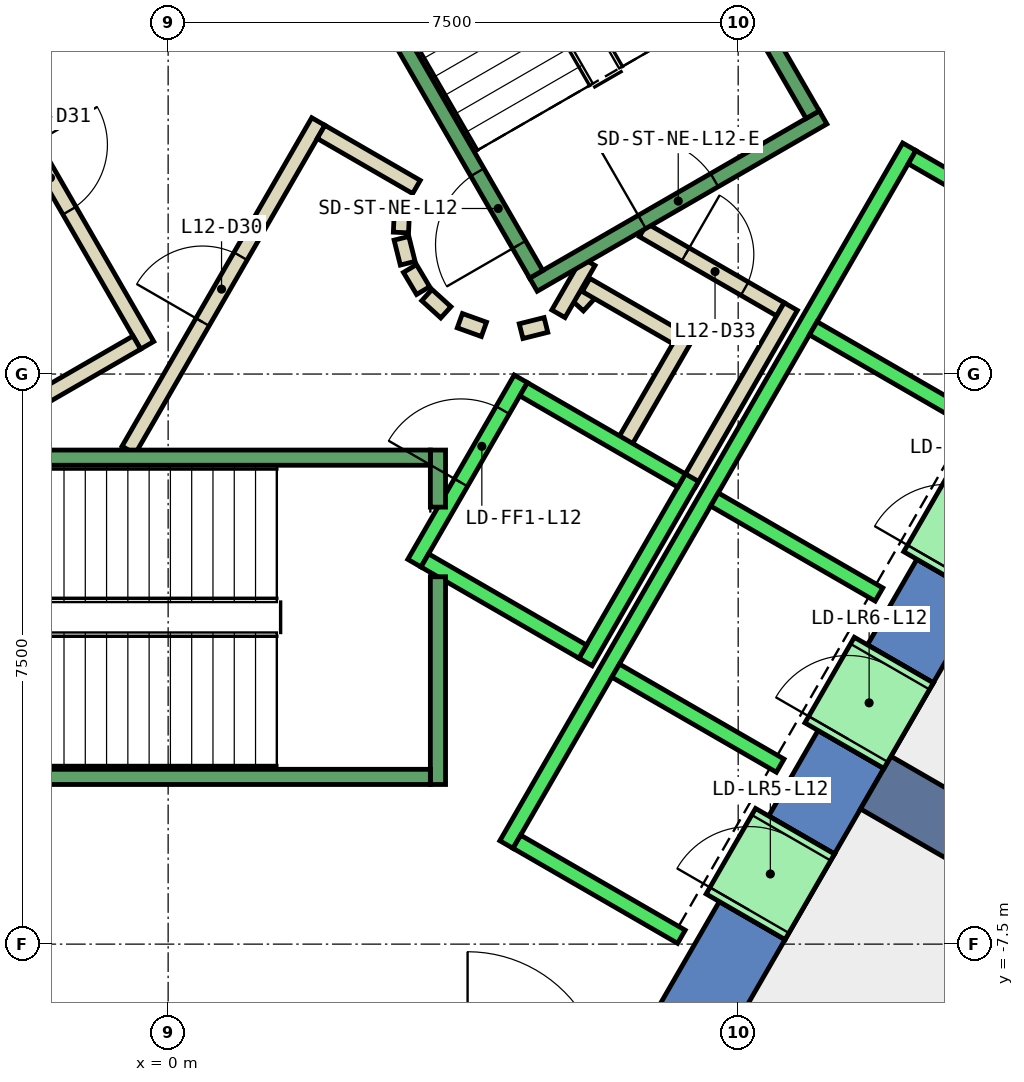
"""IFC4 building model, lengths in metres.
Left out: names, types, materials, properties, quantities, classifications, styles, units other than length and angle.
Written with IfcOpenShell. Run it as: python <this file> out.ifc"""

import sys

from ifc_helpers import new_model, si_unit, direction, frame, frame_2d, origin, place, context, subcontext, project, spatial, polyline, rectangle, outline, extrude, element, fill, save


model = new_model("IFC4")
c1 = context("Model", 3, precision=1e-05, world=origin(), true_north=direction((0.0, 1.0)))
c2 = subcontext(c1, "Body", "Model", "MODEL_VIEW")
j1 = project(units=[si_unit("LENGTHUNIT", "METRE"), si_unit("PLANEANGLEUNIT", "RADIAN")], contexts=[c1])
p1 = place(None, origin())
s1 = spatial("IfcSite", under=j1, at=p1, CompositionType="ELEMENT")
p2 = place(p1, origin())
s2 = spatial("IfcBuilding", under=s1, at=p2, CompositionType="ELEMENT")
p3 = place(p2, frame((0.0, 0.0, 60.2)))
s3 = spatial("IfcBuildingStorey", under=s2, at=p3, CompositionType="ELEMENT", Elevation=60.2)
p4 = place(p3, frame((0.0, 0.0, -0.4)))
e1 = element("IfcWall", 1, at=p4, inside=s3, PredefinedType="SHEAR", context=c2, shape_type="SweptSolid", body=[
    extrude(outline(polyline([(8.517, 11.748), (7.651, 11.248), (12.702, 2.5), (13.856, 2.5), (8.517, 11.748)])), origin(), (0.0, 0.0, 1.0), 4.2),
])
p5 = place(p3, frame((0.0, 0.0, -0.4)))
e2 = element("IfcWall", 2, at=p5, inside=s3, PredefinedType="SHEAR", context=c2, shape_type="SweptSolid", body=[
    extrude(outline(polyline([(8.117, -7.44), (7.252, -6.94), (6.351, -8.5), (6.928, -9.5), (8.117, -7.44)])), origin(), (0.0, 0.0, 1.0), 4.2),
])
p6 = place(p3, frame((0.0, 0.0, -0.4)))
e3 = element("IfcWall", 3, at=p6, inside=s3, PredefinedType="SHEAR", context=c2, shape_type="SweptSolid", body=[
    extrude(outline(polyline([(9.417, -5.189), (8.551, -4.689), (7.902, -5.814), (8.767, -6.314), (9.417, -5.189)])), origin(), (0.0, 0.0, 1.0), 4.2),
])
p7 = place(p3, frame((0.0, 0.0, -0.4)))
e4 = element("IfcWall", 4, at=p7, inside=s3, PredefinedType="SHEAR", context=c2, shape_type="SweptSolid", body=[
    extrude(outline(polyline([(10.717, -2.937), (9.851, -2.437), (9.201, -3.563), (10.067, -4.063), (10.717, -2.937)])), origin(), (0.0, 0.0, 1.0), 4.2),
])
p8 = place(p3, frame((0.0, 0.0, 3.6)))
e5 = element("IfcWall", 5, at=p8, inside=s3, PredefinedType="SHEAR", context=c2, shape_type="SweptSolid", body=[
    extrude(outline(polyline([(8.767, -6.314), (7.902, -5.814), (7.252, -6.94), (8.117, -7.44), (8.767, -6.314)])), origin(), (0.0, 0.0, 1.0), 0.2),
])
p9 = place(p3, frame((0.0, 0.0, 3.6)))
e6 = element("IfcWall", 6, at=p9, inside=s3, PredefinedType="SHEAR", context=c2, shape_type="SweptSolid", body=[
    extrude(outline(polyline([(10.067, -4.063), (9.201, -3.563), (8.551, -4.689), (9.417, -5.189), (10.067, -4.063)])), origin(), (0.0, 0.0, 1.0), 0.2),
])
p10 = place(p3, frame((0.0, 0.0, 3.6)))
e7 = element("IfcWall", 7, at=p10, inside=s3, PredefinedType="SHEAR", context=c2, shape_type="SweptSolid", body=[
    extrude(outline(polyline([(11.367, -1.811), (10.501, -1.311), (9.851, -2.437), (10.717, -2.937), (11.367, -1.811)])), origin(), (0.0, 0.0, 1.0), 0.2),
])
p11 = place(p3, frame((9.31, -5.375, -0.4), z_axis=(0.0, 0.0, 1.0), x_axis=(0.866017533419, -0.500013631625, 0.0)))
e8 = element("IfcWall", 8, at=p11, inside=s3, PredefinedType="SHEAR", context=c2, shape_type="SweptSolid", body=[
    extrude(rectangle(XDim=9.0, YDim=0.8, at=frame_2d((4.5, 0.0))), origin(), (0.0, 0.0, 1.0), 4.2),
])
p12 = place(p3, frame((5.39, 0.898, 0.0), z_axis=(0.0, 0.0, 1.0), x_axis=(0.673828488714, 0.738887791073, 0.0)))
e9 = element("IfcWall", 9, at=p12, inside=s3, PredefinedType="PARTITIONING", context=c2, shape_type="SweptSolid", body=[
    extrude(rectangle(XDim=0.263, YDim=0.2, at=frame_2d((0.131, 0.0))), origin(), (0.0, 0.0, 1.0), 3.8),
])
p13 = place(p3, frame((5.499, 1.172, 0.0), z_axis=(0.0, 0.0, 1.0), x_axis=(0.866333505267, -0.499465972466, 0.0)))
e10 = element("IfcWall", 10, at=p13, inside=s3, PredefinedType="PARTITIONING", context=c2, shape_type="SweptSolid", body=[
    extrude(rectangle(XDim=1.374, YDim=0.2, at=frame_2d((0.687, 0.0))), origin(), (0.0, 0.0, 1.0), 3.8),
])
p14 = place(p3, frame((6.826, 0.522, 0.0), z_axis=(0.0, 0.0, 1.0), x_axis=(-0.500016722714, -0.866015748706, 0.0)))
e11 = element("IfcWall", 11, at=p14, inside=s3, PredefinedType="PARTITIONING", context=c2, shape_type="SweptSolid", body=[
    extrude(rectangle(XDim=1.7, YDim=0.2, at=frame_2d((0.85, 0.0))), origin(), (0.0, 0.0, 1.0), 3.8),
])
p15 = place(p3, frame((6.25, 1.894, 0.0), z_axis=(0.0, 0.0, 1.0), x_axis=(0.866043184279, -0.499969202016, 0.0)))
e12 = element("IfcWall", 12, at=p15, inside=s3, PredefinedType="PARTITIONING", context=c2, shape_type="SweptSolid", body=[
    extrude(rectangle(XDim=2.084, YDim=0.2, at=frame_2d((1.042, 0.0))), origin(), (0.0, 0.0, 1.0), 3.8),
])
p16 = place(p15, frame((0.642, 0.0, 0.0)))
e13 = element("IfcOpeningElement", 13, at=p16, cuts=e12, PredefinedType="OPENING", context=c2, shape_type="SweptSolid", body=[
    extrude(rectangle(XDim=0.9, YDim=2.1, at=frame_2d((0.45, 1.05))), frame((0.0, 0.11, 0.0), z_axis=(0.0, -1.0, 0.0), x_axis=(1.0, 0.0, 0.0)), (0.0, 0.0, 1.0), 0.22),
])
p17 = place(p3, frame((8.192, 0.888, 0.0), z_axis=(0.0, 0.0, 1.0), x_axis=(-0.499940625693, -0.866059680843, 0.0)))
e14 = element("IfcWall", 14, at=p17, inside=s3, PredefinedType="PARTITIONING", context=c2, shape_type="SweptSolid", body=[
    extrude(rectangle(XDim=2.68, YDim=0.2, at=frame_2d((1.34, 0.0))), origin(), (0.0, 0.0, 1.0), 3.8),
])
p18 = place(p3, frame((5.135, 0.793, 0.0), z_axis=(0.0, 0.0, 1.0), x_axis=(0.499526442893, 0.866298639529, 0.0)))
e15 = element("IfcWall", 15, at=p18, inside=s3, PredefinedType="PARTITIONING", context=c2, shape_type="SweptSolid", body=[
    extrude(rectangle(XDim=0.791, YDim=0.2, at=frame_2d((0.396, 0.0))), origin(), (0.0, 0.0, 1.0), 3.8),
])
p19 = place(p3, frame((-0.52, -1.0, 0.0), z_axis=(0.0, 0.0, 1.0), x_axis=(0.50011622646, 0.865958290007, 0.0)))
e16 = element("IfcWall", 16, at=p19, inside=s3, PredefinedType="PARTITIONING", context=c2, shape_type="SweptSolid", body=[
    extrude(rectangle(XDim=4.991, YDim=0.2, at=frame_2d((2.496, 0.0))), origin(), (0.0, 0.0, 1.0), 3.8),
])
p20 = place(p19, frame((1.945, 0.0, 0.0)))
e17 = element("IfcOpeningElement", 17, at=p20, cuts=e16, PredefinedType="OPENING", context=c2, shape_type="SweptSolid", body=[
    extrude(rectangle(XDim=1.0, YDim=2.1, at=frame_2d((0.5, 1.05))), frame((0.0, 0.11, 0.0), z_axis=(0.0, -1.0, 0.0), x_axis=(1.0, 0.0, 0.0)), (0.0, 0.0, 1.0), 0.22),
])
p21 = place(p3, frame((2.012, 3.186, 0.0), z_axis=(0.0, 0.0, 1.0), x_axis=(0.865891012941, -0.500232699559, 0.0)))
e18 = element("IfcWall", 18, at=p21, inside=s3, PredefinedType="PARTITIONING", context=c2, shape_type="SweptSolid", body=[
    extrude(rectangle(XDim=1.449, YDim=0.2, at=frame_2d((0.725, 0.0))), origin(), (0.0, 0.0, 1.0), 3.8),
])
p22 = place(p3, frame((3.079, 2.199, 0.0), z_axis=(0.0, 0.0, 1.0), x_axis=(-0.047771483479, -0.998858290933, 0.0)))
e19 = element("IfcWall", 19, at=p22, inside=s3, PredefinedType="PARTITIONING", context=c2, shape_type="SweptSolid", body=[
    extrude(rectangle(XDim=0.337, YDim=0.2, at=frame_2d((0.169, 0.0))), origin(), (0.0, 0.0, 1.0), 3.8),
])
p23 = place(p3, frame((3.07, 1.786, 0.0), z_axis=(0.0, 0.0, 1.0), x_axis=(0.242705583207, -0.970099994784, 0.0)))
e20 = element("IfcWall", 20, at=p23, inside=s3, PredefinedType="PARTITIONING", context=c2, shape_type="SweptSolid", body=[
    extrude(rectangle(XDim=0.338, YDim=0.2, at=frame_2d((0.169, 0.0))), origin(), (0.0, 0.0, 1.0), 3.8),
])
for number, where, z_axis, x_axis in (
    (21, (3.182, 1.388, 0.0), (0.0, 0.0, 1.0), (0.512, -0.859, 0.0)),
    (22, (3.404, 1.039, 0.0), (0.0, 0.0, 1.0), (0.74, -0.672, 0.0)),
):
    element("IfcWall", number, at=place(p3, frame(where, z_axis=z_axis, x_axis=x_axis)), inside=s3, PredefinedType="PARTITIONING", context=c2, shape_type="SweptSolid", body=[
        extrude(rectangle(XDim=0.338, YDim=0.2, at=frame_2d((0.169, 0.0))), origin(), (0.0, 0.0, 1.0), 3.8),
    ])
p24 = place(p3, frame((3.838, 0.702, 0.0), z_axis=(0.0, 0.0, 1.0), x_axis=(0.941035081519, -0.338308993895, 0.0)))
e23 = element("IfcWall", 23, at=p24, inside=s3, PredefinedType="PARTITIONING", context=c2, shape_type="SweptSolid", body=[
    extrude(rectangle(XDim=0.337, YDim=0.2, at=frame_2d((0.168, 0.0))), origin(), (0.0, 0.0, 1.0), 3.8),
])
p25 = place(p3, frame((4.644, 0.564, 0.0), z_axis=(0.0, 0.0, 1.0), x_axis=(0.969929076366, 0.243387729394, 0.0)))
e24 = element("IfcWall", 24, at=p25, inside=s3, PredefinedType="PARTITIONING", context=c2, shape_type="SweptSolid", body=[
    extrude(rectangle(XDim=0.337, YDim=0.2, at=frame_2d((0.168, 0.0))), origin(), (0.0, 0.0, 1.0), 3.8),
])
p26 = place(p3, frame((-2.771, 4.7, 0.0), z_axis=(0.0, 0.0, 1.0), x_axis=(0.499969479948, -0.866043023828, 0.0)))
e25 = element("IfcWall", 25, at=p26, inside=s3, PredefinedType="PARTITIONING", context=c2, shape_type="SweptSolid", body=[
    extrude(rectangle(XDim=4.99, YDim=0.2, at=frame_2d((2.495, 0.0))), origin(), (0.0, 0.0, 1.0), 3.8),
])
p27 = place(p26, frame((1.945, 0.0, 0.0)))
e26 = element("IfcOpeningElement", 26, at=p27, cuts=e25, PredefinedType="OPENING", context=c2, shape_type="SweptSolid", body=[
    extrude(rectangle(XDim=1.0, YDim=2.1, at=frame_2d((0.5, 1.05))), frame((0.0, 0.11, 0.0), z_axis=(0.0, -1.0, 0.0), x_axis=(1.0, 0.0, 0.0)), (0.0, 0.0, 1.0), 0.22),
])
p28 = place(p3, frame((-0.412, 0.414, 0.0), z_axis=(0.0, 0.0, 1.0), x_axis=(-0.866017369001, -0.500013916395, 0.0)))
e27 = element("IfcWall", 27, at=p28, inside=s3, PredefinedType="PARTITIONING", context=c2, shape_type="SweptSolid", body=[
    extrude(rectangle(XDim=1.45, YDim=0.2, at=frame_2d((0.725, 0.0))), origin(), (0.0, 0.0, 1.0), 3.8),
])
p29 = place(p3, frame((12.401, -7.622, 0.0), z_axis=(0.0, 0.0, 1.0), x_axis=(-0.500029185841, -0.866008552675, 0.0)))
e28 = element("IfcWall", 28, at=p29, inside=s3, PredefinedType="PARTITIONING", context=c2, shape_type="SweptSolid", body=[
    extrude(rectangle(XDim=9.301, YDim=0.2, at=frame_2d((4.651, 0.0))), origin(), (0.0, 0.0, 1.0), 3.8),
])
p30 = place(p3, frame((3.24, -2.488, 0.0), z_axis=(0.0, 0.0, 1.0), x_axis=(0.49994636267, 0.866056369097, 0.0)))
e29 = element("IfcWall", 29, at=p30, inside=s3, PredefinedType="STANDARD", context=c2, shape_type="SweptSolid", body=[
    extrude(rectangle(XDim=2.8, YDim=0.2, at=frame_2d((1.4, 0.0))), origin(), (0.0, 0.0, 1.0), 3.8),
])
p31 = place(p30, frame((1.225, 0.0, 0.0)))
e30 = element("IfcOpeningElement", 30, at=p31, cuts=e29, PredefinedType="OPENING", context=c2, shape_type="SweptSolid", body=[
    extrude(rectangle(XDim=1.1, YDim=2.1, at=frame_2d((0.55, 1.05))), frame((0.0, 0.11, 0.0), z_axis=(0.0, -1.0, 0.0), x_axis=(1.0, 0.0, 0.0)), (0.0, 0.0, 1.0), 0.22),
])
p32 = place(p3, frame((5.492, -3.788, 0.0), z_axis=(0.0, 0.0, 1.0), x_axis=(0.500011755427, 0.866018616679, 0.0)))
e31 = element("IfcWall", 31, at=p32, inside=s3, PredefinedType="STANDARD", context=c2, shape_type="SweptSolid", body=[
    extrude(rectangle(XDim=2.8, YDim=0.2, at=frame_2d((1.4, 0.0))), origin(), (0.0, 0.0, 1.0), 3.8),
])
p33 = place(p3, frame((3.377, -2.452, 0.0), z_axis=(0.0, 0.0, 1.0), x_axis=(0.865955154139, -0.50012165622, 0.0)))
e32 = element("IfcWall", 32, at=p33, inside=s3, PredefinedType="STANDARD", context=c2, shape_type="SweptSolid", body=[
    extrude(rectangle(XDim=2.4, YDim=0.2, at=frame_2d((1.2, 0.0))), origin(), (0.0, 0.0, 1.0), 3.8),
])
p34 = place(p3, frame((4.677, -0.2, 0.0), z_axis=(0.0, 0.0, 1.0), x_axis=(0.865973769406, -0.500089422704, 0.0)))
e33 = element("IfcWall", 33, at=p34, inside=s3, PredefinedType="STANDARD", context=c2, shape_type="SweptSolid", body=[
    extrude(rectangle(XDim=2.399, YDim=0.2, at=frame_2d((1.2, 0.0))), origin(), (0.0, 0.0, 1.0), 3.8),
])
p35 = place(p3, frame((4.451, -6.19, 0.0), z_axis=(0.0, 0.0, 1.0), x_axis=(0.50000090737, 0.866024879913, 0.0)))
e34 = element("IfcWall", 34, at=p35, inside=s3, PredefinedType="STANDARD", context=c2, shape_type="SweptSolid", body=[
    extrude(rectangle(XDim=10.6, YDim=0.2, at=frame_2d((5.3, 0.0))), origin(), (0.0, 0.0, 1.0), 3.8),
])
for number, where, z_axis, x_axis in (
    (35, (4.588, -6.153, 0.0), (0.0, 0.0, 1.0), (0.866, -0.5, 0.0)),
    (36, (5.888, -3.902, 0.0), (0.0, 0.0, 1.0), (0.866, -0.5, 0.0)),
    (37, (7.188, -1.65, 0.0), (0.0, 0.0, 1.0), (0.866, -0.5, 0.0)),
    (38, (8.488, 0.602, 0.0), (0.0, 0.0, 1.0), (0.866, -0.5, 0.0)),
):
    element("IfcWall", number, at=place(p3, frame(where, z_axis=z_axis, x_axis=x_axis)), inside=s3, PredefinedType="STANDARD", context=c2, shape_type="SweptSolid", body=[
        extrude(rectangle(XDim=2.5, YDim=0.2, at=frame_2d((1.25, 0.0))), origin(), (0.0, 0.0, 1.0), 3.8),
    ])
p36 = place(p3, frame((9.788, 2.853, 0.0), z_axis=(0.0, 0.0, 1.0), x_axis=(0.865998541277, -0.500046524342, 0.0)))
e39 = element("IfcWall", 39, at=p36, inside=s3, PredefinedType="STANDARD", context=c2, shape_type="SweptSolid", body=[
    extrude(rectangle(XDim=2.5, YDim=0.2, at=frame_2d((1.25, 0.0))), origin(), (0.0, 0.0, 1.0), 3.8),
])
p37 = place(p3, frame((7.598, -7.14, 0.0), z_axis=(0.0, 0.0, 1.0), x_axis=(0.500362116554, 0.865816234728, 0.0)))
e40 = element("IfcWall", 40, at=p37, inside=s3, PredefinedType="STANDARD", context=c2, shape_type="SweptSolid", body=[
    extrude(rectangle(XDim=1.299, YDim=1.2, at=frame_2d((0.65, 0.0))), origin(), (0.0, 0.0, 1.0), 2.4),
])
p38 = place(p37, frame((0.1, 0.0, 0.0)))
e41 = element("IfcOpeningElement", 41, at=p38, cuts=e40, PredefinedType="OPENING", context=c2, shape_type="SweptSolid", body=[
    extrude(rectangle(XDim=1.1, YDim=2.3, at=frame_2d((0.55, 1.15))), frame((0.0, 0.61, 0.0), z_axis=(0.0, -1.0, 0.0), x_axis=(1.0, 0.0, 0.0)), (0.0, 0.0, 1.0), 1.22),
])
p39 = place(p3, frame((8.898, -4.889, 0.0), z_axis=(0.0, 0.0, 1.0), x_axis=(0.500036693733, 0.866004217611, 0.0)))
e42 = element("IfcWall", 42, at=p39, inside=s3, PredefinedType="STANDARD", context=c2, shape_type="SweptSolid", body=[
    extrude(rectangle(XDim=1.3, YDim=1.2, at=frame_2d((0.65, 0.0))), origin(), (0.0, 0.0, 1.0), 2.4),
])
p40 = place(p39, frame((0.1, 0.0, 0.0)))
e43 = element("IfcOpeningElement", 43, at=p40, cuts=e42, PredefinedType="OPENING", context=c2, shape_type="SweptSolid", body=[
    extrude(rectangle(XDim=1.1, YDim=2.3, at=frame_2d((0.55, 1.15))), frame((0.0, 0.61, 0.0), z_axis=(0.0, -1.0, 0.0), x_axis=(1.0, 0.0, 0.0)), (0.0, 0.0, 1.0), 1.22),
])
p41 = place(p3, frame((10.198, -2.637, 0.0), z_axis=(0.0, 0.0, 1.0), x_axis=(0.49989585183, 0.866085525409, 0.0)))
e44 = element("IfcWall", 44, at=p41, inside=s3, PredefinedType="STANDARD", context=c2, shape_type="SweptSolid", body=[
    extrude(rectangle(XDim=1.3, YDim=1.2, at=frame_2d((0.65, 0.0))), origin(), (0.0, 0.0, 1.0), 2.4),
])
p42 = place(p41, frame((0.1, 0.0, 0.0)))
e45 = element("IfcOpeningElement", 45, at=p42, cuts=e44, PredefinedType="OPENING", context=c2, shape_type="SweptSolid", body=[
    extrude(rectangle(XDim=1.1, YDim=2.3, at=frame_2d((0.55, 1.15))), frame((0.0, 0.61, 0.0), z_axis=(0.0, -1.0, 0.0), x_axis=(1.0, 0.0, 0.0)), (0.0, 0.0, 1.0), 1.22),
])
p43 = place(p3, frame((3.55, -2.667, 0.0), z_axis=(0.0, 0.0, 1.0), x_axis=(0.0, -1.0, 0.0)))
e46 = element("IfcWall", 46, at=p43, inside=s3, PredefinedType="STANDARD", context=c2, shape_type="SweptSolid", body=[
    extrude(rectangle(XDim=2.733, YDim=0.2, at=frame_2d((1.366, 0.0))), origin(), (0.0, 0.0, 1.0), 3.8),
])
p44 = place(p3, frame((3.55, -1.0, 0.0), z_axis=(0.0, 0.0, 1.0), x_axis=(0.0, -1.0, 0.0)))
e47 = element("IfcWall", 47, at=p44, inside=s3, PredefinedType="STANDARD", context=c2, shape_type="SweptSolid", body=[
    extrude(rectangle(XDim=0.751, YDim=0.2, at=frame_2d((0.375, 0.0))), origin(), (0.0, 0.0, 1.0), 3.8),
])
p45 = place(p3, frame((-3.45, -1.1, 0.0), z_axis=(0.0, 0.0, 1.0), x_axis=(1.0, 0.0, 0.0)))
e48 = element("IfcWall", 48, at=p45, inside=s3, PredefinedType="STANDARD", context=c2, shape_type="SweptSolid", body=[
    extrude(rectangle(XDim=6.9, YDim=0.2, at=frame_2d((3.45, 0.0))), origin(), (0.0, 0.0, 1.0), 3.8),
])
p46 = place(p45, frame((0.45, 0.0, 0.0)))
e49 = element("IfcOpeningElement", 49, at=p46, cuts=e48, PredefinedType="OPENING", context=c2, shape_type="SweptSolid", body=[
    extrude(rectangle(XDim=1.1, YDim=2.2, at=frame_2d((0.55, 1.1))), frame((0.0, 0.11, 0.0), z_axis=(0.0, -1.0, 0.0), x_axis=(1.0, 0.0, 0.0)), (0.0, 0.0, 1.0), 0.22),
])
p47 = place(p3, frame((-3.45, -5.3, 0.0), z_axis=(0.0, 0.0, 1.0), x_axis=(1.0, 0.0, 0.0)))
e50 = element("IfcWall", 50, at=p47, inside=s3, PredefinedType="STANDARD", context=c2, shape_type="SweptSolid", body=[
    extrude(rectangle(XDim=6.9, YDim=0.2, at=frame_2d((3.45, 0.0))), origin(), (0.0, 0.0, 1.0), 3.8),
])
p48 = place(p3, frame((4.806, 1.176, 0.0), z_axis=(0.0, 0.0, 1.0), x_axis=(0.866059941101, 0.499940174841, 0.0)))
e51 = element("IfcWall", 51, at=p48, inside=s3, PredefinedType="STANDARD", context=c2, shape_type="SweptSolid", body=[
    extrude(rectangle(XDim=4.4, YDim=0.2, at=frame_2d((2.2, 0.0))), origin(), (0.0, 0.0, 1.0), 3.8),
])
p49 = place(p48, frame((1.65, 0.0, 0.0)))
e52 = element("IfcOpeningElement", 52, at=p49, cuts=e51, PredefinedType="OPENING", context=c2, shape_type="SweptSolid", body=[
    extrude(rectangle(XDim=1.1, YDim=2.2, at=frame_2d((0.55, 1.1))), frame((0.0, 0.11, 0.0), z_axis=(0.0, -1.0, 0.0), x_axis=(1.0, 0.0, 0.0)), (0.0, 0.0, 1.0), 0.22),
])
p50 = place(p3, frame((4.843, 1.312, 0.0), z_axis=(0.0, 0.0, 1.0), x_axis=(-0.499963383562, 0.866046543262, 0.0)))
e53 = element("IfcWall", 53, at=p50, inside=s3, PredefinedType="STANDARD", context=c2, shape_type="SweptSolid", body=[
    extrude(rectangle(XDim=6.9, YDim=0.2, at=frame_2d((3.45, 0.0))), origin(), (0.0, 0.0, 1.0), 3.8),
])
p51 = place(p50, frame((0.45, 0.0, 0.0)))
e54 = element("IfcOpeningElement", 54, at=p51, cuts=e53, PredefinedType="OPENING", context=c2, shape_type="SweptSolid", body=[
    extrude(rectangle(XDim=1.1, YDim=2.2, at=frame_2d((0.55, 1.1))), frame((0.0, 0.11, 0.0), z_axis=(0.0, -1.0, 0.0), x_axis=(1.0, 0.0, 0.0)), (0.0, 0.0, 1.0), 0.22),
])
p52 = place(p3, frame((8.48, 3.412, 0.0), z_axis=(0.0, 0.0, 1.0), x_axis=(-0.499978703459, 0.866037698999, 0.0)))
e55 = element("IfcWall", 55, at=p52, inside=s3, PredefinedType="STANDARD", context=c2, shape_type="SweptSolid", body=[
    extrude(rectangle(XDim=6.9, YDim=0.2, at=frame_2d((3.45, 0.0))), origin(), (0.0, 0.0, 1.0), 3.8),
])
p53 = place(p3, frame((-1.393, 7.288, 0.0), z_axis=(0.0, 0.0, 1.0), x_axis=(-0.499963383562, -0.866046543262, 0.0)))
e56 = element("IfcWall", 56, at=p53, inside=s3, PredefinedType="STANDARD", context=c2, shape_type="SweptSolid", body=[
    extrude(rectangle(XDim=6.9, YDim=0.2, at=frame_2d((3.45, 0.0))), origin(), (0.0, 0.0, 1.0), 3.8),
])
p54 = place(p53, frame((0.45, 0.0, 0.0)))
e57 = element("IfcOpeningElement", 57, at=p54, cuts=e56, PredefinedType="OPENING", context=c2, shape_type="SweptSolid", body=[
    extrude(rectangle(XDim=1.1, YDim=2.2, at=frame_2d((0.55, 1.1))), frame((0.0, 0.11, 0.0), z_axis=(0.0, -1.0, 0.0), x_axis=(1.0, 0.0, 0.0)), (0.0, 0.0, 1.0), 0.22),
])
p55 = place(p20, origin())
e58 = element("IfcDoor", 58, at=p55, inside=s3, OperationType="SINGLE_SWING_LEFT", PredefinedType="DOOR", context=c2, shape_type="SweptSolid", body=[
    extrude(rectangle(XDim=1.0, YDim=2.1, at=frame_2d((0.5, 1.05))), frame((0.0, 0.025, 0.0), z_axis=(0.0, -1.0, 0.0), x_axis=(1.0, 0.0, 0.0)), (0.0, 0.0, 1.0), 0.05),
])
fill(e17, e58)
p56 = place(p27, origin())
e59 = element("IfcDoor", 59, at=p56, inside=s3, OperationType="SINGLE_SWING_RIGHT", PredefinedType="DOOR", context=c2, shape_type="SweptSolid", body=[
    extrude(rectangle(XDim=1.0, YDim=2.1, at=frame_2d((0.5, 1.05))), frame((0.0, 0.025, 0.0), z_axis=(0.0, -1.0, 0.0), x_axis=(1.0, 0.0, 0.0)), (0.0, 0.0, 1.0), 0.05),
])
fill(e26, e59)
p57 = place(p16, origin())
e60 = element("IfcDoor", 60, at=p57, inside=s3, OperationType="SINGLE_SWING_LEFT", PredefinedType="DOOR", context=c2, shape_type="SweptSolid", body=[
    extrude(rectangle(XDim=0.9, YDim=2.1, at=frame_2d((0.45, 1.05))), frame((0.0, 0.025, 0.0), z_axis=(0.0, -1.0, 0.0), x_axis=(1.0, 0.0, 0.0)), (0.0, 0.0, 1.0), 0.05),
])
fill(e13, e60)
p58 = place(p38, origin())
e61 = element("IfcDoor", 61, at=p58, inside=s3, OperationType="SLIDING_TO_LEFT", PredefinedType="DOOR", context=c2, shape_type="SweptSolid", body=[
    extrude(rectangle(XDim=1.1, YDim=2.3, at=frame_2d((0.55, 1.15))), frame((0.0, 0.025, 0.0), z_axis=(0.0, -1.0, 0.0), x_axis=(1.0, 0.0, 0.0)), (0.0, 0.0, 1.0), 0.05),
])
fill(e41, e61)
p59 = place(p40, origin())
e62 = element("IfcDoor", 62, at=p59, inside=s3, OperationType="SLIDING_TO_LEFT", PredefinedType="DOOR", context=c2, shape_type="SweptSolid", body=[
    extrude(rectangle(XDim=1.1, YDim=2.3, at=frame_2d((0.55, 1.15))), frame((0.0, 0.025, 0.0), z_axis=(0.0, -1.0, 0.0), x_axis=(1.0, 0.0, 0.0)), (0.0, 0.0, 1.0), 0.05),
])
fill(e43, e62)
p60 = place(p31, origin())
e63 = element("IfcDoor", 63, at=p60, inside=s3, OperationType="SLIDING_TO_LEFT", PredefinedType="DOOR", context=c2, shape_type="SweptSolid", body=[
    extrude(rectangle(XDim=1.1, YDim=2.1, at=frame_2d((0.55, 1.05))), frame((0.0, 0.025, 0.0), z_axis=(0.0, -1.0, 0.0), x_axis=(1.0, 0.0, 0.0)), (0.0, 0.0, 1.0), 0.05),
])
fill(e30, e63)
p61 = place(p51, origin())
e64 = element("IfcDoor", 64, at=p61, inside=s3, OperationType="SINGLE_SWING_LEFT", PredefinedType="DOOR", context=c2, shape_type="SweptSolid", body=[
    extrude(rectangle(XDim=1.1, YDim=2.2, at=frame_2d((0.55, 1.1))), frame((0.0, 0.025, 0.0), z_axis=(0.0, -1.0, 0.0), x_axis=(1.0, 0.0, 0.0)), (0.0, 0.0, 1.0), 0.05),
])
fill(e54, e64)
p62 = place(p49, origin())
e65 = element("IfcDoor", 65, at=p62, inside=s3, OperationType="SINGLE_SWING_LEFT", PredefinedType="DOOR", context=c2, shape_type="SweptSolid", body=[
    extrude(rectangle(XDim=1.1, YDim=2.2, at=frame_2d((0.55, 1.1))), frame((0.0, 0.025, 0.0), z_axis=(0.0, -1.0, 0.0), x_axis=(1.0, 0.0, 0.0)), (0.0, 0.0, 1.0), 0.05),
])
fill(e52, e65)
save(model, sys.argv[1])
